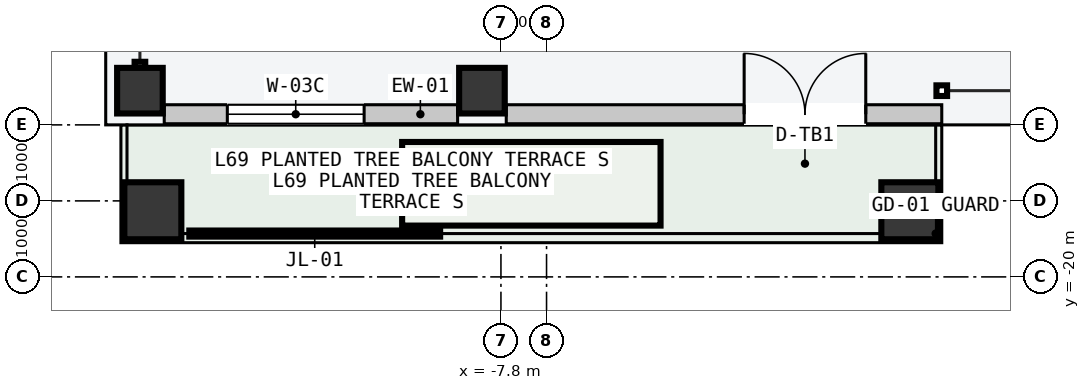
"""IFC4 building model, lengths in metres.
Left out: names, types, materials, properties, quantities, classifications, styles, units other than length and angle.
Written with IfcOpenShell. Run it as: python <this file> out.ifc"""

import sys

from ifc_helpers import new_model, si_unit, direction, frame, frame_2d, origin, origin_2d, place, context, subcontext, project, spatial, rectangle, hollow_rectangle, extrude, element, fill, save


model = new_model("IFC4")
c1 = context("Model", 3, precision=1e-05, world=origin(), true_north=direction((0.0, 1.0)))
c2 = subcontext(c1, "Body", "Model", "MODEL_VIEW")
j1 = project(units=[si_unit("LENGTHUNIT", "METRE"), si_unit("PLANEANGLEUNIT", "RADIAN")], contexts=[c1])
p1 = place(None, origin())
s1 = spatial("IfcSite", under=j1, at=p1, CompositionType="ELEMENT")
p2 = place(p1, origin())
s2 = spatial("IfcBuilding", under=s1, at=p2, CompositionType="ELEMENT")
p3 = place(p2, frame((0.0, 0.0, 261.6)))
s3 = spatial("IfcBuildingStorey", under=s2, at=p3, CompositionType="ELEMENT", Elevation=261.6)
for number, where, z_axis, x_axis in (
    (1, (-12.55, -17.55, 0.0), (0.0, 0.0, 1.0), (1.0, 0.0, 0.0)),
    (2, (-8.05, -17.55, 0.0), (0.0, 0.0, 1.0), (1.0, 0.0, 0.0)),
):
    element("IfcColumn", number, at=place(p3, frame(where, z_axis=z_axis, x_axis=x_axis)), inside=s3, PredefinedType="COLUMN", context=c2, shape_type="SweptSolid", body=[
        extrude(hollow_rectangle(XDim=0.6, YDim=0.6, WallThickness=0.025, at=origin_2d()), origin(), (0.0, 0.0, 1.0), 3.6),
    ])
for number, where, z_axis, x_axis in (
    (3, (-12.38, -19.13, 0.0), (0.0, 0.0, 1.0), (1.0, 0.0, 0.0)),
    (4, (-2.42, -19.13, 0.0), (0.0, 0.0, 1.0), (1.0, 0.0, 0.0)),
):
    element("IfcColumn", number, at=place(p3, frame(where, z_axis=z_axis, x_axis=x_axis)), inside=s3, PredefinedType="COLUMN", context=c2, shape_type="SweptSolid", body=[
        extrude(hollow_rectangle(XDim=0.75, YDim=0.75, WallThickness=0.032, at=origin_2d()), origin(), (0.0, 0.0, 1.0), 3.6),
    ])
p4 = place(p3, frame((-12.23, -17.86, 0.0), z_axis=(0.0, 0.0, 1.0), x_axis=(1.0, 0.0, 0.0)))
e5 = element("IfcWall", 5, at=p4, inside=s3, PredefinedType="STANDARD", context=c2, shape_type="SweptSolid", body=[
    extrude(rectangle(XDim=3.86, YDim=0.25, at=frame_2d((1.93, 0.0))), origin(), (0.0, 0.0, 1.0), 3.4),
])
p5 = place(p4, frame((0.83, 0.0, 0.85)))
e6 = element("IfcOpeningElement", 6, at=p5, cuts=e5, PredefinedType="OPENING", context=c2, shape_type="SweptSolid", body=[
    extrude(rectangle(XDim=1.8, YDim=2.05, at=frame_2d((0.9, 1.025))), frame((0.0, 0.135, 0.0), z_axis=(0.0, -1.0, 0.0), x_axis=(1.0, 0.0, 0.0)), (0.0, 0.0, 1.0), 0.27),
])
p6 = place(p3, frame((-7.73, -17.86, 0.0), z_axis=(0.0, 0.0, 1.0), x_axis=(1.0, 0.0, 0.0)))
e7 = element("IfcWall", 7, at=p6, inside=s3, PredefinedType="STANDARD", context=c2, shape_type="SweptSolid", body=[
    extrude(rectangle(XDim=5.73, YDim=0.25, at=frame_2d((2.865, 0.0))), origin(), (0.0, 0.0, 1.0), 3.4),
])
p7 = place(p6, frame((3.13, 0.0, 0.0)))
e8 = element("IfcOpeningElement", 8, at=p7, cuts=e7, PredefinedType="OPENING", context=c2, shape_type="SweptSolid", body=[
    extrude(rectangle(XDim=1.6, YDim=2.2, at=frame_2d((0.8, 1.1))), frame((0.0, 0.135, 0.0), z_axis=(0.0, -1.0, 0.0), x_axis=(1.0, 0.0, 0.0)), (0.0, 0.0, 1.0), 0.27),
])
p8 = place(p5, origin())
e9 = element("IfcWindow", 9, at=p8, inside=s3, PartitioningType="SINGLE_PANEL", PredefinedType="WINDOW", context=c2, shape_type="SweptSolid", body=[
    extrude(rectangle(XDim=1.8, YDim=2.05, at=frame_2d((0.9, 1.025))), frame((0.0, 0.03, 0.0), z_axis=(0.0, -1.0, 0.0), x_axis=(1.0, 0.0, 0.0)), (0.0, 0.0, 1.0), 0.06),
])
fill(e6, e9)
p9 = place(p7, origin())
e10 = element("IfcDoor", 10, at=p9, inside=s3, OperationType="DOUBLE_DOOR_SINGLE_SWING", PredefinedType="DOOR", context=c2, shape_type="SweptSolid", body=[
    extrude(rectangle(XDim=1.6, YDim=2.2, at=frame_2d((0.8, 1.1))), frame((0.0, 0.025, 0.0), z_axis=(0.0, -1.0, 0.0), x_axis=(1.0, 0.0, 0.0)), (0.0, 0.0, 1.0), 0.05),
])
fill(e8, e10)
save(model, sys.argv[1])
